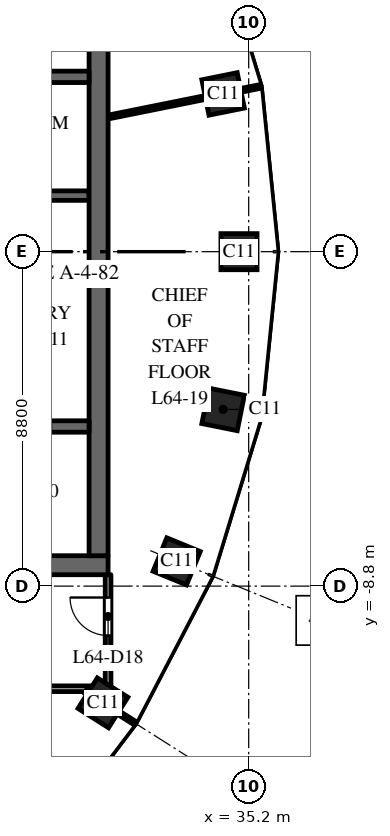
"""IFC4 building model, lengths in metres.
Left out: names, types, materials, properties, quantities, classifications, styles, units other than length and angle.
Written with IfcOpenShell. Run it as: python <this file> out.ifc"""

import sys

from ifc_helpers import new_model, si_unit, direction, frame, frame_2d, origin, origin_2d, place, context, subcontext, project, spatial, rectangle, extrude, element, fill, save


model = new_model("IFC4")
c1 = context("Model", 3, precision=1e-05, world=origin(), true_north=direction((0.0, 1.0)))
c2 = subcontext(c1, "Body", "Model", "MODEL_VIEW")
j1 = project(units=[si_unit("LENGTHUNIT", "METRE"), si_unit("PLANEANGLEUNIT", "RADIAN")], contexts=[c1])
p1 = place(None, origin())
s1 = spatial("IfcSite", under=j1, at=p1, CompositionType="ELEMENT")
p2 = place(p1, origin())
s2 = spatial("IfcBuilding", under=s1, at=p2, CompositionType="ELEMENT")
p3 = place(p2, frame((0.0, 0.0, 299.0)))
s3 = spatial("IfcBuildingStorey", under=s2, at=p3, CompositionType="ELEMENT", Elevation=299.0)
for number, where, z_axis, x_axis in (
    (1, (34.945, 0.0, 0.0), (0.0, 0.0, 1.0), (0.0, 1.0, 0.0)),
    (2, (34.527, 4.151, 0.0), (0.0, 0.0, 1.0), (-0.197, 0.98, 0.0)),
    (3, (31.365, -11.871, 0.0), (0.0, 0.0, 1.0), (0.535, 0.845, 0.0)),
    (4, (33.305, -8.149, 0.0), (0.0, 0.0, 1.0), (0.379, 0.925, 0.0)),
    (5, (34.527, -4.151, 0.0), (0.0, 0.0, 1.0), (0.197, 0.98, 0.0)),
):
    element("IfcColumn", number, at=place(p3, frame(where, z_axis=z_axis, x_axis=x_axis)), inside=s3, PredefinedType="COLUMN", context=c2, shape_type="SweptSolid", body=[
        extrude(rectangle(XDim=0.95, YDim=0.95, at=origin_2d()), origin(), (0.0, 0.0, 1.0), 4.0),
    ])
p4 = place(p3, frame((16.5, -8.25, 0.0), z_axis=(0.0, 0.0, 1.0), x_axis=(1.0, 0.0, 0.0)))
e6 = element("IfcWall", 6, at=p4, inside=s3, PredefinedType="SHEAR", context=c2, shape_type="SweptSolid", body=[
    extrude(rectangle(XDim=15.0, YDim=0.5, at=frame_2d((7.5, 0.0))), origin(), (0.0, 0.0, 1.0), 3.7),
])
p5 = place(p4, frame((6.9, 0.0, 0.0)))
e7 = element("IfcOpeningElement", 7, at=p5, cuts=e6, PredefinedType="OPENING", context=c2, shape_type="SweptSolid", body=[
    extrude(rectangle(XDim=1.2, YDim=2.1, at=frame_2d((0.6, 1.05))), frame((0.0, 0.26, 0.0), z_axis=(0.0, -1.0, 0.0), x_axis=(1.0, 0.0, 0.0)), (0.0, 0.0, 1.0), 0.52),
])
p6 = place(p4, frame((12.05, 0.0, 0.0)))
e8 = element("IfcOpeningElement", 8, at=p6, cuts=e6, PredefinedType="OPENING", context=c2, shape_type="SweptSolid", body=[
    extrude(rectangle(XDim=0.9, YDim=2.1, at=frame_2d((0.45, 1.05))), frame((0.0, 0.26, 0.0), z_axis=(0.0, -1.0, 0.0), x_axis=(1.0, 0.0, 0.0)), (0.0, 0.0, 1.0), 0.52),
])
p7 = place(p3, frame((27.8, 1.475, 0.0), z_axis=(0.0, 0.0, 1.0), x_axis=(1.0, 0.0, 0.0)))
e9 = element("IfcWall", 9, at=p7, inside=s3, PredefinedType="SHEAR", context=c2, shape_type="SweptSolid", body=[
    extrude(rectangle(XDim=3.2, YDim=0.25, at=frame_2d((1.6, 0.0))), origin(), (0.0, 0.0, 1.0), 3.7),
])
p8 = place(p3, frame((31.25, -8.0, 0.0), z_axis=(0.0, 0.0, 1.0), x_axis=(0.0, 1.0, 0.0)))
e10 = element("IfcWall", 10, at=p8, inside=s3, PredefinedType="SHEAR", context=c2, shape_type="SweptSolid", body=[
    extrude(rectangle(XDim=16.0, YDim=0.5, at=frame_2d((8.0, 0.0))), origin(), (0.0, 0.0, 1.0), 3.7),
])
p9 = place(p3, frame((24.9, 4.6, 0.0), z_axis=(0.0, 0.0, 1.0), x_axis=(1.0, 0.0, 0.0)))
e11 = element("IfcWall", 11, at=p9, inside=s3, PredefinedType="SHEAR", context=c2, shape_type="SweptSolid", body=[
    extrude(rectangle(XDim=6.1, YDim=0.3, at=frame_2d((3.05, 0.0))), origin(), (0.0, 0.0, 1.0), 3.7),
])
p10 = place(p3, frame((24.9, -4.6, 0.0), z_axis=(0.0, 0.0, 1.0), x_axis=(1.0, 0.0, 0.0)))
e12 = element("IfcWall", 12, at=p10, inside=s3, PredefinedType="SHEAR", context=c2, shape_type="SweptSolid", body=[
    extrude(rectangle(XDim=6.1, YDim=0.3, at=frame_2d((3.05, 0.0))), origin(), (0.0, 0.0, 1.0), 3.7),
])
p11 = place(p10, frame((4.2, 0.0, 0.0)))
e13 = element("IfcOpeningElement", 13, at=p11, cuts=e12, PredefinedType="OPENING", context=c2, shape_type="SweptSolid", body=[
    extrude(rectangle(XDim=0.9, YDim=2.1, at=frame_2d((0.45, 1.05))), frame((0.0, 0.16, 0.0), z_axis=(0.0, -1.0, 0.0), x_axis=(1.0, 0.0, 0.0)), (0.0, 0.0, 1.0), 0.32),
])
p12 = place(p3, frame((7.129, -11.5, 0.0), z_axis=(0.0, 0.0, 1.0), x_axis=(1.0, 0.0, 0.0)))
e14 = element("IfcWall", 14, at=p12, inside=s3, PredefinedType="PARTITIONING", context=c2, shape_type="SweptSolid", body=[
    extrude(rectangle(XDim=24.371, YDim=0.15, at=frame_2d((12.186, 0.0))), origin(), (0.0, 0.0, 1.0), 2.75),
])
p13 = place(p12, frame((0.633, 0.0, 0.0)))
e15 = element("IfcOpeningElement", 15, at=p13, cuts=e14, PredefinedType="OPENING", context=c2, shape_type="SweptSolid", body=[
    extrude(rectangle(XDim=1.0, YDim=2.1, at=frame_2d((0.5, 1.05))), frame((0.0, 0.085, 0.0), z_axis=(0.0, -1.0, 0.0), x_axis=(1.0, 0.0, 0.0)), (0.0, 0.0, 1.0), 0.17),
])
p14 = place(p12, frame((10.195, 0.0, 0.0)))
e16 = element("IfcOpeningElement", 16, at=p14, cuts=e14, PredefinedType="OPENING", context=c2, shape_type="SweptSolid", body=[
    extrude(rectangle(XDim=1.0, YDim=2.1, at=frame_2d((0.5, 1.05))), frame((0.0, 0.085, 0.0), z_axis=(0.0, -1.0, 0.0), x_axis=(1.0, 0.0, 0.0)), (0.0, 0.0, 1.0), 0.17),
])
p15 = place(p3, frame((30.897, -11.575, 0.0), z_axis=(0.0, 0.0, 1.0), x_axis=(0.844757626245, -0.535149094086, 0.0)))
e17 = element("IfcWall", 17, at=p15, inside=s3, PredefinedType="PARTITIONING", context=c2, shape_type="SweptSolid", body=[
    extrude(rectangle(XDim=1.557, YDim=0.1, at=frame_2d((0.778, 0.0))), origin(), (0.0, 0.0, 1.0), 3.0),
])
p16 = place(p3, frame((31.5, -11.5, 0.0), z_axis=(0.0, 0.0, 1.0), x_axis=(0.0, 1.0, 0.0)))
e18 = element("IfcWall", 18, at=p16, inside=s3, PredefinedType="PARTITIONING", context=c2, shape_type="SweptSolid", body=[
    extrude(rectangle(XDim=3.0, YDim=0.15, at=frame_2d((1.5, 0.0))), origin(), (0.0, 0.0, 1.0), 3.0),
])
p17 = place(p16, frame((1.4, 0.0, 0.0)))
e19 = element("IfcOpeningElement", 19, at=p17, cuts=e18, PredefinedType="OPENING", context=c2, shape_type="SweptSolid", body=[
    extrude(rectangle(XDim=1.0, YDim=2.1, at=frame_2d((0.5, 1.05))), frame((0.0, 0.085, 0.0), z_axis=(0.0, -1.0, 0.0), x_axis=(1.0, 0.0, 0.0)), (0.0, 0.0, 1.0), 0.17),
])
p18 = place(p3, frame((31.5, 3.542, 0.0), z_axis=(0.0, 0.0, 1.0), x_axis=(0.980357474535, 0.197228857227, 0.0)))
e20 = element("IfcWall", 20, at=p18, inside=s3, PredefinedType="PARTITIONING", context=c2, shape_type="SweptSolid", body=[
    extrude(rectangle(XDim=4.092, YDim=0.1, at=frame_2d((2.046, 0.0))), origin(), (0.0, 0.0, 1.0), 3.0),
])
p19 = place(p17, origin())
e21 = element("IfcDoor", 21, at=p19, inside=s3, OperationType="SINGLE_SWING_RIGHT", PredefinedType="DOOR", context=c2, shape_type="SweptSolid", body=[
    extrude(rectangle(XDim=1.0, YDim=2.1, at=frame_2d((0.5, 1.05))), frame((0.0, 0.025, 0.0), z_axis=(0.0, -1.0, 0.0), x_axis=(1.0, 0.0, 0.0)), (0.0, 0.0, 1.0), 0.05),
])
fill(e19, e21)
save(model, sys.argv[1])
